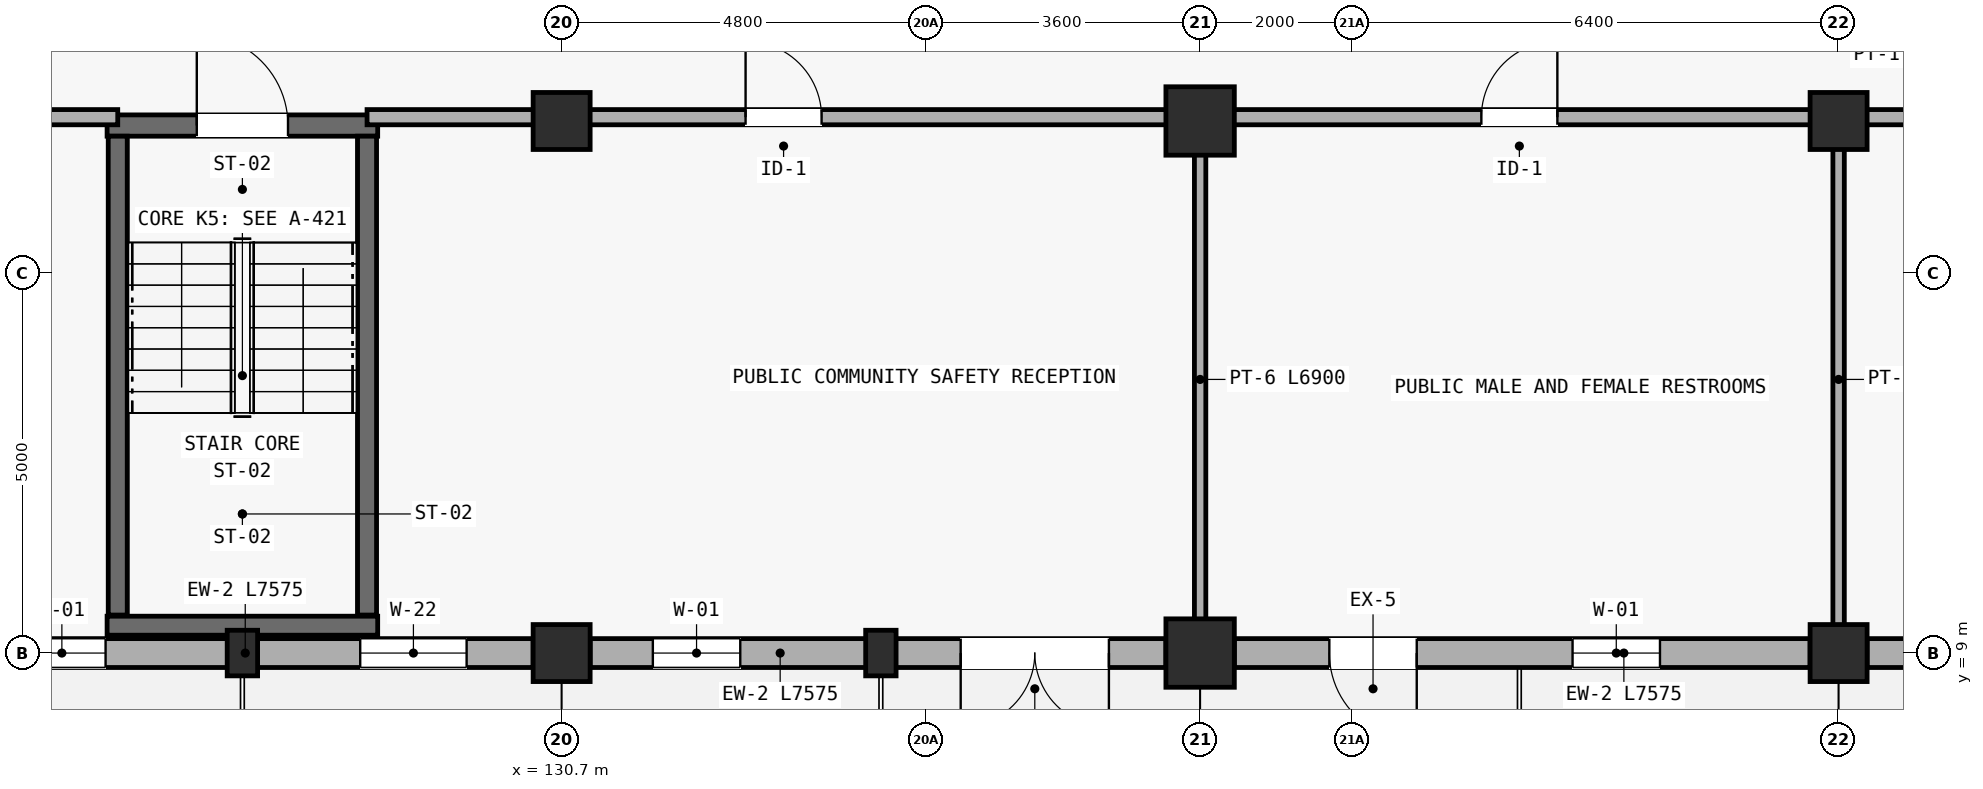
"""IFC4 building model, lengths in metres.
Left out: names, types, materials, properties, quantities, classifications, styles, units other than length and angle.
Written with IfcOpenShell. Run it as: python <this file> out.ifc"""

import sys

from ifc_helpers import new_model, si_unit, direction, frame, frame_2d, origin, origin_2d, place, context, subcontext, project, spatial, rectangle, extrude, element, fill, save


model = new_model("IFC4")
c1 = context("Model", 3, precision=1e-05, world=origin(), true_north=direction((0.0, 1.0)))
c2 = subcontext(c1, "Body", "Model", "MODEL_VIEW")
j1 = project(units=[si_unit("LENGTHUNIT", "METRE"), si_unit("PLANEANGLEUNIT", "RADIAN")], contexts=[c1])
p1 = place(None, origin())
s1 = spatial("IfcSite", under=j1, at=p1, CompositionType="ELEMENT")
p2 = place(p1, origin())
s2 = spatial("IfcBuilding", under=s1, at=p2, CompositionType="ELEMENT")
p3 = place(p2, origin())
s3 = spatial("IfcBuildingStorey", under=s2, at=p3, CompositionType="ELEMENT", Elevation=0.0)
for number, where, z_axis, x_axis in (
    (1, (130.7, 9.0, 0.0), (0.0, 0.0, 1.0), (1.0, 0.0, 0.0)),
    (2, (130.7, 16.0, 0.0), (0.0, 0.0, 1.0), (1.0, 0.0, 0.0)),
):
    element("IfcColumn", number, at=place(p3, frame(where, z_axis=z_axis, x_axis=x_axis)), inside=s3, PredefinedType="COLUMN", context=c2, shape_type="SweptSolid", body=[
        extrude(rectangle(XDim=0.75, YDim=0.75, at=origin_2d()), origin(), (0.0, 0.0, 1.0), 5.85),
    ])
for number, where, z_axis, x_axis in (
    (3, (139.1, 9.0, 0.0), (0.0, 0.0, 1.0), (1.0, 0.0, 0.0)),
    (4, (139.1, 16.0, 0.0), (0.0, 0.0, 1.0), (1.0, 0.0, 0.0)),
):
    element("IfcColumn", number, at=place(p3, frame(where, z_axis=z_axis, x_axis=x_axis)), inside=s3, PredefinedType="COLUMN", context=c2, shape_type="SweptSolid", body=[
        extrude(rectangle(XDim=0.9, YDim=0.9, at=origin_2d()), origin(), (0.0, 0.0, 1.0), 5.85),
    ])
for number, where, z_axis, x_axis in (
    (5, (147.5, 9.0, 0.0), (0.0, 0.0, 1.0), (1.0, 0.0, 0.0)),
    (6, (147.5, 16.0, 0.0), (0.0, 0.0, 1.0), (1.0, 0.0, 0.0)),
):
    element("IfcColumn", number, at=place(p3, frame(where, z_axis=z_axis, x_axis=x_axis)), inside=s3, PredefinedType="COLUMN", context=c2, shape_type="SweptSolid", body=[
        extrude(rectangle(XDim=0.75, YDim=0.75, at=origin_2d()), origin(), (0.0, 0.0, 1.0), 5.85),
    ])
for number, where, z_axis, x_axis in (
    (7, (126.5, 9.0, 0.0), (0.0, 0.0, 1.0), (1.0, 0.0, 0.0)),
    (8, (134.9, 9.0, 0.0), (0.0, 0.0, 1.0), (1.0, 0.0, 0.0)),
):
    element("IfcColumn", number, at=place(p3, frame(where, z_axis=z_axis, x_axis=x_axis)), inside=s3, PredefinedType="PILASTER", context=c2, shape_type="SweptSolid", body=[
        extrude(rectangle(XDim=0.4, YDim=0.6, at=origin_2d()), origin(), (0.0, 0.0, 1.0), 5.85),
    ])
p4 = place(p3, frame((122.75, 9.0, 0.0), z_axis=(0.0, 0.0, 1.0), x_axis=(1.0, 0.0, 0.0)))
e9 = element("IfcWall", 9, at=p4, inside=s3, PredefinedType="STANDARD", context=c2, shape_type="SweptSolid", body=[
    extrude(rectangle(XDim=7.575, YDim=0.38, at=frame_2d((3.788, 0.0))), origin(), (0.0, 0.0, 1.0), 4.75),
])
p5 = place(p4, frame((0.8, 0.0, 0.75)))
e10 = element("IfcOpeningElement", 10, at=p5, cuts=e9, PredefinedType="OPENING", context=c2, shape_type="SweptSolid", body=[
    extrude(rectangle(XDim=1.15, YDim=1.45, at=frame_2d((0.575, 0.725))), frame((0.0, 0.2, 0.0), z_axis=(0.0, -1.0, 0.0), x_axis=(1.0, 0.0, 0.0)), (0.0, 0.0, 1.0), 0.4),
])
p6 = place(p4, frame((5.3, 0.0, 0.75)))
e11 = element("IfcOpeningElement", 11, at=p6, cuts=e9, PredefinedType="OPENING", context=c2, shape_type="SweptSolid", body=[
    extrude(rectangle(XDim=1.4, YDim=1.45, at=frame_2d((0.7, 0.725))), frame((0.0, 0.2, 0.0), z_axis=(0.0, -1.0, 0.0), x_axis=(1.0, 0.0, 0.0)), (0.0, 0.0, 1.0), 0.4),
])
p7 = place(p3, frame((131.075, 9.0, 0.0), z_axis=(0.0, 0.0, 1.0), x_axis=(1.0, 0.0, 0.0)))
e12 = element("IfcWall", 12, at=p7, inside=s3, PredefinedType="STANDARD", context=c2, shape_type="SweptSolid", body=[
    extrude(rectangle(XDim=7.575, YDim=0.38, at=frame_2d((3.788, 0.0))), origin(), (0.0, 0.0, 1.0), 4.75),
])
p8 = place(p7, frame((4.875, 0.0, 0.0)))
e13 = element("IfcOpeningElement", 13, at=p8, cuts=e12, PredefinedType="OPENING", context=c2, shape_type="SweptSolid", body=[
    extrude(rectangle(XDim=1.95, YDim=2.3, at=frame_2d((0.975, 1.15))), frame((0.0, 0.2, 0.0), z_axis=(0.0, -1.0, 0.0), x_axis=(1.0, 0.0, 0.0)), (0.0, 0.0, 1.0), 0.4),
])
p9 = place(p7, frame((0.825, 0.0, 0.85)))
e14 = element("IfcOpeningElement", 14, at=p9, cuts=e12, PredefinedType="OPENING", context=c2, shape_type="SweptSolid", body=[
    extrude(rectangle(XDim=1.15, YDim=1.45, at=frame_2d((0.575, 0.725))), frame((0.0, 0.2, 0.0), z_axis=(0.0, -1.0, 0.0), x_axis=(1.0, 0.0, 0.0)), (0.0, 0.0, 1.0), 0.4),
])
p10 = place(p3, frame((139.55, 9.0, 0.0), z_axis=(0.0, 0.0, 1.0), x_axis=(1.0, 0.0, 0.0)))
e15 = element("IfcWall", 15, at=p10, inside=s3, PredefinedType="STANDARD", context=c2, shape_type="SweptSolid", body=[
    extrude(rectangle(XDim=7.575, YDim=0.38, at=frame_2d((3.788, 0.0))), origin(), (0.0, 0.0, 1.0), 4.75),
])
p11 = place(p10, frame((1.25, 0.0, 0.0)))
e16 = element("IfcOpeningElement", 16, at=p11, cuts=e15, PredefinedType="OPENING", context=c2, shape_type="SweptSolid", body=[
    extrude(rectangle(XDim=1.15, YDim=2.15, at=frame_2d((0.575, 1.075))), frame((0.0, 0.2, 0.0), z_axis=(0.0, -1.0, 0.0), x_axis=(1.0, 0.0, 0.0)), (0.0, 0.0, 1.0), 0.4),
])
p12 = place(p10, frame((4.45, 0.0, 0.85)))
e17 = element("IfcOpeningElement", 17, at=p12, cuts=e15, PredefinedType="OPENING", context=c2, shape_type="SweptSolid", body=[
    extrude(rectangle(XDim=1.15, YDim=1.45, at=frame_2d((0.575, 0.725))), frame((0.0, 0.2, 0.0), z_axis=(0.0, -1.0, 0.0), x_axis=(1.0, 0.0, 0.0)), (0.0, 0.0, 1.0), 0.4),
])
p13 = place(p3, frame((147.875, 9.0, 0.0), z_axis=(0.0, 0.0, 1.0), x_axis=(1.0, 0.0, 0.0)))
e18 = element("IfcWall", 18, at=p13, inside=s3, PredefinedType="STANDARD", context=c2, shape_type="SweptSolid", body=[
    extrude(rectangle(XDim=7.575, YDim=0.38, at=frame_2d((3.788, 0.0))), origin(), (0.0, 0.0, 1.0), 4.75),
])
p14 = place(p13, frame((0.875, 0.0, 0.75)))
e19 = element("IfcOpeningElement", 19, at=p14, cuts=e18, PredefinedType="OPENING", context=c2, shape_type="SweptSolid", body=[
    extrude(rectangle(XDim=2.2, YDim=1.45, at=frame_2d((1.1, 0.725))), frame((0.0, 0.2, 0.0), z_axis=(0.0, -1.0, 0.0), x_axis=(1.0, 0.0, 0.0)), (0.0, 0.0, 1.0), 0.4),
])
p15 = place(p13, frame((5.375, 0.0, 0.75)))
e20 = element("IfcOpeningElement", 20, at=p15, cuts=e18, PredefinedType="OPENING", context=c2, shape_type="SweptSolid", body=[
    extrude(rectangle(XDim=1.5, YDim=1.4, at=frame_2d((0.75, 0.7))), frame((0.0, 0.2, 0.0), z_axis=(0.0, -1.0, 0.0), x_axis=(1.0, 0.0, 0.0)), (0.0, 0.0, 1.0), 0.4),
])
p16 = place(p3, frame((124.72, 15.94, 0.0), z_axis=(0.0, 0.0, 1.0), x_axis=(1.0, 0.0, 0.0)))
e21 = element("IfcWall", 21, at=p16, inside=s3, PredefinedType="SHEAR", context=c2, shape_type="SweptSolid", body=[
    extrude(rectangle(XDim=3.56, YDim=0.28, at=frame_2d((1.78, 0.0))), origin(), (0.0, 0.0, 1.0), 5.6),
])
p17 = place(p16, frame((1.18, 0.0, 0.0)))
e22 = element("IfcOpeningElement", 22, at=p17, cuts=e21, PredefinedType="OPENING", context=c2, shape_type="SweptSolid", body=[
    extrude(rectangle(XDim=1.2, YDim=2.15, at=frame_2d((0.6, 1.075))), frame((0.0, 0.15, 0.0), z_axis=(0.0, -1.0, 0.0), x_axis=(1.0, 0.0, 0.0)), (0.0, 0.0, 1.0), 0.3),
])
p18 = place(p3, frame((128.28, 9.36, 0.0), z_axis=(0.0, 0.0, 1.0), x_axis=(-1.0, 0.0, 0.0)))
e23 = element("IfcWall", 23, at=p18, inside=s3, PredefinedType="SHEAR", context=c2, shape_type="SweptSolid", body=[
    extrude(rectangle(XDim=3.56, YDim=0.25, at=frame_2d((1.78, 0.0))), origin(), (0.0, 0.0, 1.0), 5.6),
])
for number, where, z_axis, x_axis in (
    (24, (124.86, 15.8, 0.0), (0.0, 0.0, 1.0), (0.0, -1.0, 0.0)),
    (25, (128.14, 9.5, 0.0), (0.0, 0.0, 1.0), (0.0, 1.0, 0.0)),
):
    element("IfcWall", number, at=place(p3, frame(where, z_axis=z_axis, x_axis=x_axis)), inside=s3, PredefinedType="SHEAR", context=c2, shape_type="SweptSolid", body=[
        extrude(rectangle(XDim=6.3, YDim=0.25, at=frame_2d((3.15, 0.0))), origin(), (0.0, 0.0, 1.0), 5.6),
    ])
p19 = place(p3, frame((121.13, 16.05, 0.0), z_axis=(0.0, 0.0, 1.0), x_axis=(1.0, 0.0, 0.0)))
e26 = element("IfcWall", 26, at=p19, inside=s3, PredefinedType="PARTITIONING", context=c2, shape_type="SweptSolid", body=[
    extrude(rectangle(XDim=3.73, YDim=0.2, at=frame_2d((1.865, 0.0))), origin(), (0.0, 0.0, 1.0), 4.19),
])
p20 = place(p3, frame((128.14, 16.05, 0.0), z_axis=(0.0, 0.0, 1.0), x_axis=(1.0, 0.0, 0.0)))
e27 = element("IfcWall", 27, at=p20, inside=s3, PredefinedType="PARTITIONING", context=c2, shape_type="SweptSolid", body=[
    extrude(rectangle(XDim=10.96, YDim=0.2, at=frame_2d((5.48, 0.0))), origin(), (0.0, 0.0, 1.0), 4.19),
])
p21 = place(p20, frame((4.98, 0.0, 0.0)))
e28 = element("IfcOpeningElement", 28, at=p21, cuts=e27, PredefinedType="OPENING", context=c2, shape_type="SweptSolid", body=[
    extrude(rectangle(XDim=1.0, YDim=2.12, at=frame_2d((0.5, 1.06))), frame((0.0, 0.11, 0.0), z_axis=(0.0, -1.0, 0.0), x_axis=(1.0, 0.0, 0.0)), (0.0, 0.0, 1.0), 0.22),
])
p22 = place(p3, frame((139.1, 16.05, 0.0), z_axis=(0.0, 0.0, 1.0), x_axis=(1.0, 0.0, 0.0)))
e29 = element("IfcWall", 29, at=p22, inside=s3, PredefinedType="PARTITIONING", context=c2, shape_type="SweptSolid", body=[
    extrude(rectangle(XDim=8.4, YDim=0.2, at=frame_2d((4.2, 0.0))), origin(), (0.0, 0.0, 1.0), 4.19),
])
p23 = place(p22, frame((3.7, 0.0, 0.0)))
e30 = element("IfcOpeningElement", 30, at=p23, cuts=e29, PredefinedType="OPENING", context=c2, shape_type="SweptSolid", body=[
    extrude(rectangle(XDim=1.0, YDim=2.12, at=frame_2d((0.5, 1.06))), frame((0.0, 0.11, 0.0), z_axis=(0.0, -1.0, 0.0), x_axis=(1.0, 0.0, 0.0)), (0.0, 0.0, 1.0), 0.22),
])
p24 = place(p3, frame((147.5, 16.05, 0.0), z_axis=(0.0, 0.0, 1.0), x_axis=(1.0, 0.0, 0.0)))
e31 = element("IfcWall", 31, at=p24, inside=s3, PredefinedType="PARTITIONING", context=c2, shape_type="SweptSolid", body=[
    extrude(rectangle(XDim=4.3, YDim=0.2, at=frame_2d((2.15, 0.0))), origin(), (0.0, 0.0, 1.0), 4.19),
])
for number, where, z_axis, x_axis in (
    (32, (139.1, 9.15, 0.0), (0.0, 0.0, 1.0), (0.0, 1.0, 0.0)),
    (33, (147.5, 9.15, 0.0), (0.0, 0.0, 1.0), (0.0, 1.0, 0.0)),
):
    element("IfcWall", number, at=place(p3, frame(where, z_axis=z_axis, x_axis=x_axis)), inside=s3, PredefinedType="PARTITIONING", context=c2, shape_type="SweptSolid", body=[
        extrude(rectangle(XDim=6.9, YDim=0.15, at=frame_2d((3.45, 0.0))), origin(), (0.0, 0.0, 1.0), 4.19),
    ])
p25 = place(p5, origin())
e34 = element("IfcWindow", 34, at=p25, inside=s3, PartitioningType="SINGLE_PANEL", PredefinedType="WINDOW", context=c2, shape_type="SweptSolid", body=[
    extrude(rectangle(XDim=1.15, YDim=1.45, at=frame_2d((0.575, 0.725))), frame((0.0, 0.03, 0.0), z_axis=(0.0, -1.0, 0.0), x_axis=(1.0, 0.0, 0.0)), (0.0, 0.0, 1.0), 0.06),
])
fill(e10, e34)
p26 = place(p6, origin())
e35 = element("IfcWindow", 35, at=p26, inside=s3, PartitioningType="DOUBLE_PANEL_VERTICAL", PredefinedType="WINDOW", context=c2, shape_type="SweptSolid", body=[
    extrude(rectangle(XDim=1.4, YDim=1.45, at=frame_2d((0.7, 0.725))), frame((0.0, 0.03, 0.0), z_axis=(0.0, -1.0, 0.0), x_axis=(1.0, 0.0, 0.0)), (0.0, 0.0, 1.0), 0.06),
])
fill(e11, e35)
p27 = place(p8, frame((1.95, 0.0, 0.0), z_axis=(0.0, 0.0, 1.0), x_axis=(-1.0, 0.0, 0.0)))
e36 = element("IfcDoor", 36, at=p27, inside=s3, OperationType="DOUBLE_DOOR_SINGLE_SWING", PredefinedType="DOOR", context=c2, shape_type="SweptSolid", body=[
    extrude(rectangle(XDim=1.95, YDim=2.3, at=frame_2d((0.975, 1.15))), frame((0.0, 0.025, 0.0), z_axis=(0.0, -1.0, 0.0), x_axis=(1.0, 0.0, 0.0)), (0.0, 0.0, 1.0), 0.05),
])
fill(e13, e36)
p28 = place(p9, origin())
e37 = element("IfcWindow", 37, at=p28, inside=s3, PartitioningType="SINGLE_PANEL", PredefinedType="WINDOW", context=c2, shape_type="SweptSolid", body=[
    extrude(rectangle(XDim=1.15, YDim=1.45, at=frame_2d((0.575, 0.725))), frame((0.0, 0.03, 0.0), z_axis=(0.0, -1.0, 0.0), x_axis=(1.0, 0.0, 0.0)), (0.0, 0.0, 1.0), 0.06),
])
fill(e14, e37)
p29 = place(p11, frame((1.15, 0.0, 0.0), z_axis=(0.0, 0.0, 1.0), x_axis=(-1.0, 0.0, 0.0)))
e38 = element("IfcDoor", 38, at=p29, inside=s3, OperationType="SINGLE_SWING_RIGHT", PredefinedType="DOOR", context=c2, shape_type="SweptSolid", body=[
    extrude(rectangle(XDim=1.15, YDim=2.15, at=frame_2d((0.575, 1.075))), frame((0.0, 0.025, 0.0), z_axis=(0.0, -1.0, 0.0), x_axis=(1.0, 0.0, 0.0)), (0.0, 0.0, 1.0), 0.05),
])
fill(e16, e38)
p30 = place(p12, origin())
e39 = element("IfcWindow", 39, at=p30, inside=s3, PartitioningType="SINGLE_PANEL", PredefinedType="WINDOW", context=c2, shape_type="SweptSolid", body=[
    extrude(rectangle(XDim=1.15, YDim=1.45, at=frame_2d((0.575, 0.725))), frame((0.0, 0.03, 0.0), z_axis=(0.0, -1.0, 0.0), x_axis=(1.0, 0.0, 0.0)), (0.0, 0.0, 1.0), 0.06),
])
fill(e17, e39)
p31 = place(p17, origin())
e40 = element("IfcDoor", 40, at=p31, inside=s3, OperationType="SINGLE_SWING_LEFT", PredefinedType="DOOR", context=c2, shape_type="SweptSolid", body=[
    extrude(rectangle(XDim=1.2, YDim=2.15, at=frame_2d((0.6, 1.075))), frame((0.0, 0.025, 0.0), z_axis=(0.0, -1.0, 0.0), x_axis=(1.0, 0.0, 0.0)), (0.0, 0.0, 1.0), 0.05),
])
fill(e22, e40)
p32 = place(p21, origin())
e41 = element("IfcDoor", 41, at=p32, inside=s3, OperationType="SINGLE_SWING_LEFT", PredefinedType="DOOR", context=c2, shape_type="SweptSolid", body=[
    extrude(rectangle(XDim=1.0, YDim=2.12, at=frame_2d((0.5, 1.06))), frame((0.0, 0.025, 0.0), z_axis=(0.0, -1.0, 0.0), x_axis=(1.0, 0.0, 0.0)), (0.0, 0.0, 1.0), 0.05),
])
fill(e28, e41)
p33 = place(p23, origin())
e42 = element("IfcDoor", 42, at=p33, inside=s3, OperationType="SINGLE_SWING_RIGHT", PredefinedType="DOOR", context=c2, shape_type="SweptSolid", body=[
    extrude(rectangle(XDim=1.0, YDim=2.12, at=frame_2d((0.5, 1.06))), frame((0.0, 0.025, 0.0), z_axis=(0.0, -1.0, 0.0), x_axis=(1.0, 0.0, 0.0)), (0.0, 0.0, 1.0), 0.05),
])
fill(e30, e42)
save(model, sys.argv[1])
